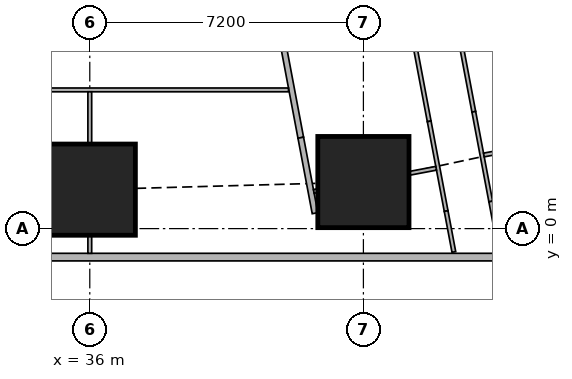
"""IFC4 building model, lengths in metres.
Left out: names, types, materials, properties, quantities, classifications, styles, units other than length and angle.
Written with IfcOpenShell. Run it as: python <this file> out.ifc"""

import sys

from ifc_helpers import new_model, si_unit, direction, frame, frame_2d, origin, origin_2d, place, context, subcontext, project, spatial, rectangle, extrude, element, fill, save


model = new_model("IFC4")
c1 = context("Model", 3, precision=1e-05, world=origin(), true_north=direction((0.0, 1.0)))
c2 = subcontext(c1, "Body", "Model", "MODEL_VIEW")
j1 = project(units=[si_unit("LENGTHUNIT", "METRE"), si_unit("PLANEANGLEUNIT", "RADIAN")], contexts=[c1])
p1 = place(None, origin())
s1 = spatial("IfcSite", under=j1, at=p1, CompositionType="ELEMENT")
p2 = place(p1, origin())
s2 = spatial("IfcBuilding", under=s1, at=p2, CompositionType="ELEMENT")
p3 = place(p2, frame((0.0, 0.0, 193.7)))
s3 = spatial("IfcBuildingStorey", under=s2, at=p3, CompositionType="ELEMENT", Elevation=193.7)
for number, where, z_axis, x_axis in (
    (1, (36.0, 1.025, 0.0), (0.0, 0.0, 1.0), (1.0, 0.0, 0.0)),
    (2, (43.2, 1.225, 0.0), (0.0, 0.0, 1.0), (1.0, 0.0, 0.0)),
):
    element("IfcColumn", number, at=place(p3, frame(where, z_axis=z_axis, x_axis=x_axis)), inside=s3, PredefinedType="COLUMN", context=c2, shape_type="SweptSolid", body=[
        extrude(rectangle(XDim=2.4, YDim=2.4, at=origin_2d()), origin(), (0.0, 0.0, 1.0), 3.75),
    ])
p4 = place(p3, frame((7.363, -0.75, 0.0), z_axis=(0.0, 0.0, 1.0), x_axis=(1.0, 0.0, 0.0)))
e3 = element("IfcWall", 3, at=p4, inside=s3, PredefinedType="SOLIDWALL", context=c2, shape_type="SweptSolid", body=[
    extrude(rectangle(XDim=40.428, YDim=0.2, at=frame_2d((20.214, 0.0))), origin(), (0.0, 0.0, 1.0), 3.5),
])
p5 = place(p4, frame((2.319, 0.0, 0.9)))
e4 = element("IfcOpeningElement", 4, at=p5, cuts=e3, PredefinedType="OPENING", context=c2, shape_type="SweptSolid", body=[
    extrude(rectangle(XDim=2.4, YDim=1.5, at=frame_2d((1.2, 0.75))), frame((0.0, 0.11, 0.0), z_axis=(0.0, -1.0, 0.0), x_axis=(1.0, 0.0, 0.0)), (0.0, 0.0, 1.0), 0.22),
])
p6 = place(p4, frame((7.937, 0.0, 0.9)))
e5 = element("IfcOpeningElement", 5, at=p6, cuts=e3, PredefinedType="OPENING", context=c2, shape_type="SweptSolid", body=[
    extrude(rectangle(XDim=1.8, YDim=1.5, at=frame_2d((0.9, 0.75))), frame((0.0, 0.11, 0.0), z_axis=(0.0, -1.0, 0.0), x_axis=(1.0, 0.0, 0.0)), (0.0, 0.0, 1.0), 0.22),
])
p7 = place(p4, frame((11.537, 0.0, 0.9)))
e6 = element("IfcOpeningElement", 6, at=p7, cuts=e3, PredefinedType="OPENING", context=c2, shape_type="SweptSolid", body=[
    extrude(rectangle(XDim=1.8, YDim=1.5, at=frame_2d((0.9, 0.75))), frame((0.0, 0.11, 0.0), z_axis=(0.0, -1.0, 0.0), x_axis=(1.0, 0.0, 0.0)), (0.0, 0.0, 1.0), 0.22),
])
p8 = place(p4, frame((15.137, 0.0, 0.9)))
e7 = element("IfcOpeningElement", 7, at=p8, cuts=e3, PredefinedType="OPENING", context=c2, shape_type="SweptSolid", body=[
    extrude(rectangle(XDim=1.8, YDim=1.5, at=frame_2d((0.9, 0.75))), frame((0.0, 0.11, 0.0), z_axis=(0.0, -1.0, 0.0), x_axis=(1.0, 0.0, 0.0)), (0.0, 0.0, 1.0), 0.22),
])
p9 = place(p4, frame((18.737, 0.0, 0.9)))
e8 = element("IfcOpeningElement", 8, at=p9, cuts=e3, PredefinedType="OPENING", context=c2, shape_type="SweptSolid", body=[
    extrude(rectangle(XDim=1.8, YDim=1.5, at=frame_2d((0.9, 0.75))), frame((0.0, 0.11, 0.0), z_axis=(0.0, -1.0, 0.0), x_axis=(1.0, 0.0, 0.0)), (0.0, 0.0, 1.0), 0.22),
])
p10 = place(p4, frame((22.337, 0.0, 0.9)))
e9 = element("IfcOpeningElement", 9, at=p10, cuts=e3, PredefinedType="OPENING", context=c2, shape_type="SweptSolid", body=[
    extrude(rectangle(XDim=1.8, YDim=1.5, at=frame_2d((0.9, 0.75))), frame((0.0, 0.11, 0.0), z_axis=(0.0, -1.0, 0.0), x_axis=(1.0, 0.0, 0.0)), (0.0, 0.0, 1.0), 0.22),
])
p11 = place(p4, frame((25.937, 0.0, 0.9)))
e10 = element("IfcOpeningElement", 10, at=p11, cuts=e3, PredefinedType="OPENING", context=c2, shape_type="SweptSolid", body=[
    extrude(rectangle(XDim=1.8, YDim=1.5, at=frame_2d((0.9, 0.75))), frame((0.0, 0.11, 0.0), z_axis=(0.0, -1.0, 0.0), x_axis=(1.0, 0.0, 0.0)), (0.0, 0.0, 1.0), 0.22),
])
p12 = place(p4, frame((29.537, 0.0, 0.9)))
e11 = element("IfcOpeningElement", 11, at=p12, cuts=e3, PredefinedType="OPENING", context=c2, shape_type="SweptSolid", body=[
    extrude(rectangle(XDim=1.8, YDim=1.5, at=frame_2d((0.9, 0.75))), frame((0.0, 0.11, 0.0), z_axis=(0.0, -1.0, 0.0), x_axis=(1.0, 0.0, 0.0)), (0.0, 0.0, 1.0), 0.22),
])
p13 = place(p4, frame((33.137, 0.0, 0.9)))
e12 = element("IfcOpeningElement", 12, at=p13, cuts=e3, PredefinedType="OPENING", context=c2, shape_type="SweptSolid", body=[
    extrude(rectangle(XDim=1.8, YDim=1.5, at=frame_2d((0.9, 0.75))), frame((0.0, 0.11, 0.0), z_axis=(0.0, -1.0, 0.0), x_axis=(1.0, 0.0, 0.0)), (0.0, 0.0, 1.0), 0.22),
])
p14 = place(p3, frame((50.653, 2.703, 0.0), z_axis=(0.0, 0.0, 1.0), x_axis=(-0.185612026696, 0.982623109613, 0.0)))
e13 = element("IfcWall", 13, at=p14, inside=s3, PredefinedType="SOLIDWALL", context=c2, shape_type="SweptSolid", body=[
    extrude(rectangle(XDim=41.393, YDim=0.2, at=frame_2d((20.697, 0.0))), origin(), (0.0, 0.0, 1.0), 3.5),
])
p15 = place(p14, frame((1.633, 0.0, 0.9)))
e14 = element("IfcOpeningElement", 14, at=p15, cuts=e13, PredefinedType="OPENING", context=c2, shape_type="SweptSolid", body=[
    extrude(rectangle(XDim=1.8, YDim=1.5, at=frame_2d((0.9, 0.75))), frame((0.0, 0.11, 0.0), z_axis=(0.0, -1.0, 0.0), x_axis=(1.0, 0.0, 0.0)), (0.0, 0.0, 1.0), 0.22),
])
p16 = place(p14, frame((6.032, 0.0, 0.9)))
e15 = element("IfcOpeningElement", 15, at=p16, cuts=e13, PredefinedType="OPENING", context=c2, shape_type="SweptSolid", body=[
    extrude(rectangle(XDim=1.8, YDim=1.5, at=frame_2d((0.9, 0.75))), frame((0.0, 0.11, 0.0), z_axis=(0.0, -1.0, 0.0), x_axis=(1.0, 0.0, 0.0)), (0.0, 0.0, 1.0), 0.22),
])
p17 = place(p14, frame((9.848, 0.0, 0.9)))
e16 = element("IfcOpeningElement", 16, at=p17, cuts=e13, PredefinedType="OPENING", context=c2, shape_type="SweptSolid", body=[
    extrude(rectangle(XDim=1.8, YDim=1.5, at=frame_2d((0.9, 0.75))), frame((0.0, 0.11, 0.0), z_axis=(0.0, -1.0, 0.0), x_axis=(1.0, 0.0, 0.0)), (0.0, 0.0, 1.0), 0.22),
])
p18 = place(p14, frame((13.664, 0.0, 0.9)))
e17 = element("IfcOpeningElement", 17, at=p18, cuts=e13, PredefinedType="OPENING", context=c2, shape_type="SweptSolid", body=[
    extrude(rectangle(XDim=1.8, YDim=1.5, at=frame_2d((0.9, 0.75))), frame((0.0, 0.11, 0.0), z_axis=(0.0, -1.0, 0.0), x_axis=(1.0, 0.0, 0.0)), (0.0, 0.0, 1.0), 0.22),
])
p19 = place(p14, frame((17.481, 0.0, 0.9)))
e18 = element("IfcOpeningElement", 18, at=p19, cuts=e13, PredefinedType="OPENING", context=c2, shape_type="SweptSolid", body=[
    extrude(rectangle(XDim=1.8, YDim=1.5, at=frame_2d((0.9, 0.75))), frame((0.0, 0.11, 0.0), z_axis=(0.0, -1.0, 0.0), x_axis=(1.0, 0.0, 0.0)), (0.0, 0.0, 1.0), 0.22),
])
p20 = place(p14, frame((21.297, 0.0, 0.9)))
e19 = element("IfcOpeningElement", 19, at=p20, cuts=e13, PredefinedType="OPENING", context=c2, shape_type="SweptSolid", body=[
    extrude(rectangle(XDim=1.8, YDim=1.5, at=frame_2d((0.9, 0.75))), frame((0.0, 0.11, 0.0), z_axis=(0.0, -1.0, 0.0), x_axis=(1.0, 0.0, 0.0)), (0.0, 0.0, 1.0), 0.22),
])
p21 = place(p14, frame((25.113, 0.0, 0.9)))
e20 = element("IfcOpeningElement", 20, at=p21, cuts=e13, PredefinedType="OPENING", context=c2, shape_type="SweptSolid", body=[
    extrude(rectangle(XDim=1.8, YDim=1.5, at=frame_2d((0.9, 0.75))), frame((0.0, 0.11, 0.0), z_axis=(0.0, -1.0, 0.0), x_axis=(1.0, 0.0, 0.0)), (0.0, 0.0, 1.0), 0.22),
])
p22 = place(p14, frame((28.93, 0.0, 0.9)))
e21 = element("IfcOpeningElement", 21, at=p22, cuts=e13, PredefinedType="OPENING", context=c2, shape_type="SweptSolid", body=[
    extrude(rectangle(XDim=1.8, YDim=1.5, at=frame_2d((0.9, 0.75))), frame((0.0, 0.11, 0.0), z_axis=(0.0, -1.0, 0.0), x_axis=(1.0, 0.0, 0.0)), (0.0, 0.0, 1.0), 0.22),
])
p23 = place(p14, frame((32.746, 0.0, 0.9)))
e22 = element("IfcOpeningElement", 22, at=p23, cuts=e13, PredefinedType="OPENING", context=c2, shape_type="SweptSolid", body=[
    extrude(rectangle(XDim=1.8, YDim=1.5, at=frame_2d((0.9, 0.75))), frame((0.0, 0.11, 0.0), z_axis=(0.0, -1.0, 0.0), x_axis=(1.0, 0.0, 0.0)), (0.0, 0.0, 1.0), 0.22),
])
p24 = place(p14, frame((36.481, 0.0, 0.9)))
e23 = element("IfcOpeningElement", 23, at=p24, cuts=e13, PredefinedType="OPENING", context=c2, shape_type="SweptSolid", body=[
    extrude(rectangle(XDim=1.8, YDim=1.5, at=frame_2d((0.9, 0.75))), frame((0.0, 0.11, 0.0), z_axis=(0.0, -1.0, 0.0), x_axis=(1.0, 0.0, 0.0)), (0.0, 0.0, 1.0), 0.22),
])
p25 = place(p3, frame((33.933, 42.73, 0.0), z_axis=(0.0, 0.0, 1.0), x_axis=(0.185595417643, -0.982626246825, 0.0)))
e24 = element("IfcWall", 24, at=p25, inside=s3, PredefinedType="SOLIDWALL", context=c2, shape_type="SweptSolid", body=[
    extrude(rectangle(XDim=41.051, YDim=0.15, at=frame_2d((20.525, 0.0))), origin(), (0.0, 0.0, 1.0), 2.5),
])
p26 = place(p25, frame((16.082, 0.0, 0.0)))
e25 = element("IfcOpeningElement", 25, at=p26, cuts=e24, PredefinedType="OPENING", context=c2, shape_type="SweptSolid", body=[
    extrude(rectangle(XDim=1.0, YDim=2.1, at=frame_2d((0.5, 1.05))), frame((0.0, 0.085, 0.0), z_axis=(0.0, -1.0, 0.0), x_axis=(1.0, 0.0, 0.0)), (0.0, 0.0, 1.0), 0.17),
])
p27 = place(p25, frame((19.898, 0.0, 0.0)))
e26 = element("IfcOpeningElement", 26, at=p27, cuts=e24, PredefinedType="OPENING", context=c2, shape_type="SweptSolid", body=[
    extrude(rectangle(XDim=1.0, YDim=2.1, at=frame_2d((0.5, 1.05))), frame((0.0, 0.085, 0.0), z_axis=(0.0, -1.0, 0.0), x_axis=(1.0, 0.0, 0.0)), (0.0, 0.0, 1.0), 0.17),
])
p28 = place(p25, frame((30.862, 0.0, 0.0)))
e27 = element("IfcOpeningElement", 27, at=p28, cuts=e24, PredefinedType="OPENING", context=c2, shape_type="SweptSolid", body=[
    extrude(rectangle(XDim=1.0, YDim=2.1, at=frame_2d((0.5, 1.05))), frame((0.0, 0.085, 0.0), z_axis=(0.0, -1.0, 0.0), x_axis=(1.0, 0.0, 0.0)), (0.0, 0.0, 1.0), 0.17),
])
p29 = place(p3, frame((41.552, 2.392, 0.0), z_axis=(0.0, 0.0, 1.0), x_axis=(0.185535500323, -0.982637561932, 0.0)))
e28 = element("IfcWall", 28, at=p29, inside=s3, PredefinedType="SOLIDWALL", context=c2, shape_type="SweptSolid", body=[
    extrude(rectangle(XDim=2.021, YDim=0.15, at=frame_2d((1.011, 0.0))), origin(), (0.0, 0.0, 1.0), 2.05),
])
p30 = place(p3, frame((41.229, 3.65, 0.0), z_axis=(0.0, 0.0, 1.0), x_axis=(-1.0, 0.0, 0.0)))
e29 = element("IfcWall", 29, at=p30, inside=s3, PredefinedType="PARTITIONING", context=c2, shape_type="SweptSolid", body=[
    extrude(rectangle(XDim=8.829, YDim=0.1, at=frame_2d((4.415, 0.0))), origin(), (0.0, 0.0, 1.0), 3.5),
])
p31 = place(p30, frame((7.729, 0.0, 0.0)))
e30 = element("IfcOpeningElement", 30, at=p31, cuts=e29, PredefinedType="OPENING", context=c2, shape_type="SweptSolid", body=[
    extrude(rectangle(XDim=0.9, YDim=2.1, at=frame_2d((0.45, 1.05))), frame((0.0, 0.06, 0.0), z_axis=(0.0, -1.0, 0.0), x_axis=(1.0, 0.0, 0.0)), (0.0, 0.0, 1.0), 0.12),
])
p32 = place(p30, frame((4.129, 0.0, 0.0)))
e31 = element("IfcOpeningElement", 31, at=p32, cuts=e29, PredefinedType="OPENING", context=c2, shape_type="SweptSolid", body=[
    extrude(rectangle(XDim=0.9, YDim=2.1, at=frame_2d((0.45, 1.05))), frame((0.0, 0.06, 0.0), z_axis=(0.0, -1.0, 0.0), x_axis=(1.0, 0.0, 0.0)), (0.0, 0.0, 1.0), 0.12),
])
p33 = place(p3, frame((36.0, -0.65, 0.0), z_axis=(0.0, 0.0, 1.0), x_axis=(0.0, 1.0, 0.0)))
e32 = element("IfcWall", 32, at=p33, inside=s3, PredefinedType="PARTITIONING", context=c2, shape_type="SweptSolid", body=[
    extrude(rectangle(XDim=0.474, YDim=0.1, at=frame_2d((0.237, 0.0))), origin(), (0.0, 0.0, 1.0), 3.5),
])
p34 = place(p3, frame((36.0, 2.226, 0.0), z_axis=(0.0, 0.0, 1.0), x_axis=(0.0, 1.0, 0.0)))
e33 = element("IfcWall", 33, at=p34, inside=s3, PredefinedType="PARTITIONING", context=c2, shape_type="SweptSolid", body=[
    extrude(rectangle(XDim=1.374, YDim=0.1, at=frame_2d((0.687, 0.0))), origin(), (0.0, 0.0, 1.0), 3.5),
])
p35 = place(p3, frame((44.727, 10.366, 0.0), z_axis=(0.0, 0.0, 1.0), x_axis=(0.185678775129, -0.982610498858, 0.0)))
e34 = element("IfcWall", 34, at=p35, inside=s3, PredefinedType="PARTITIONING", context=c2, shape_type="SweptSolid", body=[
    extrude(rectangle(XDim=7.421, YDim=0.1, at=frame_2d((3.71, 0.0))), origin(), (0.0, 0.0, 1.0), 3.5),
])
p36 = place(p35, frame((0.151, 0.0, 0.0)))
e35 = element("IfcOpeningElement", 35, at=p36, cuts=e34, PredefinedType="OPENING", context=c2, shape_type="SweptSolid", body=[
    extrude(rectangle(XDim=0.9, YDim=2.1, at=frame_2d((0.45, 1.05))), frame((0.0, 0.06, 0.0), z_axis=(0.0, -1.0, 0.0), x_axis=(1.0, 0.0, 0.0)), (0.0, 0.0, 1.0), 0.12),
])
p37 = place(p35, frame((4.65, 0.0, 0.0)))
e36 = element("IfcOpeningElement", 36, at=p37, cuts=e34, PredefinedType="OPENING", context=c2, shape_type="SweptSolid", body=[
    extrude(rectangle(XDim=0.9, YDim=2.1, at=frame_2d((0.45, 1.05))), frame((0.0, 0.06, 0.0), z_axis=(0.0, -1.0, 0.0), x_axis=(1.0, 0.0, 0.0)), (0.0, 0.0, 1.0), 0.12),
])
p38 = place(p3, frame((46.105, 3.074, 0.0), z_axis=(0.0, 0.0, 1.0), x_axis=(0.185631845838, -0.982619365681, 0.0)))
e37 = element("IfcWall", 37, at=p38, inside=s3, PredefinedType="PARTITIONING", context=c2, shape_type="SweptSolid", body=[
    extrude(rectangle(XDim=2.403, YDim=0.1, at=frame_2d((1.201, 0.0))), origin(), (0.0, 0.0, 1.0), 2.05),
])
p39 = place(p3, frame((46.551, 0.713, 0.0), z_axis=(0.0, 0.0, 1.0), x_axis=(0.185407859198, -0.982661653748, 0.0)))
e38 = element("IfcWall", 38, at=p39, inside=s3, PredefinedType="PARTITIONING", context=c2, shape_type="SweptSolid", body=[
    extrude(rectangle(XDim=1.343, YDim=0.1, at=frame_2d((0.671, 0.0))), origin(), (0.0, 0.0, 1.0), 3.5),
])
p40 = place(p3, frame((43.949, 8.02, 0.0), z_axis=(0.0, 0.0, 1.0), x_axis=(0.185656792073, -0.982614652627, 0.0)))
e39 = element("IfcWall", 39, at=p40, inside=s3, PredefinedType="PARTITIONING", context=c2, shape_type="SweptSolid", body=[
    extrude(rectangle(XDim=5.289, YDim=0.1, at=frame_2d((2.645, 0.0))), origin(), (0.0, 0.0, 1.0), 3.5),
])
p41 = place(p40, frame((1.2, 0.0, 0.0)))
e40 = element("IfcOpeningElement", 40, at=p41, cuts=e39, PredefinedType="OPENING", context=c2, shape_type="SweptSolid", body=[
    extrude(rectangle(XDim=0.9, YDim=2.1, at=frame_2d((0.45, 1.05))), frame((0.0, 0.06, 0.0), z_axis=(0.0, -1.0, 0.0), x_axis=(1.0, 0.0, 0.0)), (0.0, 0.0, 1.0), 0.12),
])
p42 = place(p40, frame((2.935, 0.0, 0.0)))
e41 = element("IfcOpeningElement", 41, at=p42, cuts=e39, PredefinedType="OPENING", context=c2, shape_type="SweptSolid", body=[
    extrude(rectangle(XDim=0.9, YDim=2.1, at=frame_2d((0.45, 1.05))), frame((0.0, 0.06, 0.0), z_axis=(0.0, -1.0, 0.0), x_axis=(1.0, 0.0, 0.0)), (0.0, 0.0, 1.0), 0.12),
])
p43 = place(p3, frame((44.931, 2.823, 0.0), z_axis=(0.0, 0.0, 1.0), x_axis=(0.185631845838, -0.982619365681, 0.0)))
e42 = element("IfcWall", 42, at=p43, inside=s3, PredefinedType="PARTITIONING", context=c2, shape_type="SweptSolid", body=[
    extrude(rectangle(XDim=2.403, YDim=0.1, at=frame_2d((1.201, 0.0))), origin(), (0.0, 0.0, 1.0), 2.05),
])
p44 = place(p3, frame((45.377, 0.462, 0.0), z_axis=(0.0, 0.0, 1.0), x_axis=(0.185513480919, -0.982641719243, 0.0)))
e43 = element("IfcWall", 43, at=p44, inside=s3, PredefinedType="PARTITIONING", context=c2, shape_type="SweptSolid", body=[
    extrude(rectangle(XDim=1.095, YDim=0.1, at=frame_2d((0.547, 0.0))), origin(), (0.0, 0.0, 1.0), 3.5),
])
p45 = place(p3, frame((46.738, 2.006, 0.0), z_axis=(0.0, 0.0, 1.0), x_axis=(-0.982820466874, -0.184564161994, 0.0)))
e44 = element("IfcWall", 44, at=p45, inside=s3, PredefinedType="PARTITIONING", context=c2, shape_type="SweptSolid", body=[
    extrude(rectangle(XDim=0.374, YDim=0.1, at=frame_2d((0.187, 0.0))), origin(), (0.0, 0.0, 1.0), 2.05),
])
p46 = place(p3, frame((45.114, 1.587, 0.0), z_axis=(0.0, 0.0, 1.0), x_axis=(-0.982671022916, -0.185358195723, 0.0)))
e45 = element("IfcWall", 45, at=p46, inside=s3, PredefinedType="PARTITIONING", context=c2, shape_type="SweptSolid", body=[
    extrude(rectangle(XDim=0.717, YDim=0.1, at=frame_2d((0.358, 0.0))), origin(), (0.0, 0.0, 1.0), 2.05),
])
p47 = place(p3, frame((41.99, 0.997, 0.0), z_axis=(0.0, 0.0, 1.0), x_axis=(-0.982382747416, -0.186880008506, 0.0)))
e46 = element("IfcWall", 46, at=p47, inside=s3, PredefinedType="PARTITIONING", context=c2, shape_type="SweptSolid", body=[
    extrude(rectangle(XDim=0.097, YDim=0.1, at=frame_2d((0.048, 0.0))), origin(), (0.0, 0.0, 1.0), 2.05),
])
p48 = place(p11, origin())
e47 = element("IfcWindow", 47, at=p48, inside=s3, PartitioningType="SINGLE_PANEL", PredefinedType="WINDOW", context=c2, shape_type="SweptSolid", body=[
    extrude(rectangle(XDim=1.8, YDim=1.5, at=frame_2d((0.9, 0.75))), frame((0.0, 0.03, 0.0), z_axis=(0.0, -1.0, 0.0), x_axis=(1.0, 0.0, 0.0)), (0.0, 0.0, 1.0), 0.06),
])
fill(e10, e47)
p49 = place(p12, origin())
e48 = element("IfcWindow", 48, at=p49, inside=s3, PartitioningType="SINGLE_PANEL", PredefinedType="WINDOW", context=c2, shape_type="SweptSolid", body=[
    extrude(rectangle(XDim=1.8, YDim=1.5, at=frame_2d((0.9, 0.75))), frame((0.0, 0.03, 0.0), z_axis=(0.0, -1.0, 0.0), x_axis=(1.0, 0.0, 0.0)), (0.0, 0.0, 1.0), 0.06),
])
fill(e11, e48)
p50 = place(p13, origin())
e49 = element("IfcWindow", 49, at=p50, inside=s3, PartitioningType="SINGLE_PANEL", PredefinedType="WINDOW", context=c2, shape_type="SweptSolid", body=[
    extrude(rectangle(XDim=1.8, YDim=1.5, at=frame_2d((0.9, 0.75))), frame((0.0, 0.03, 0.0), z_axis=(0.0, -1.0, 0.0), x_axis=(1.0, 0.0, 0.0)), (0.0, 0.0, 1.0), 0.06),
])
fill(e12, e49)
p51 = place(p32, origin())
e50 = element("IfcDoor", 50, at=p51, inside=s3, OperationType="SINGLE_SWING_RIGHT", PredefinedType="DOOR", context=c2, shape_type="SweptSolid", body=[
    extrude(rectangle(XDim=0.9, YDim=2.1, at=frame_2d((0.45, 1.05))), frame((0.0, 0.025, 0.0), z_axis=(0.0, -1.0, 0.0), x_axis=(1.0, 0.0, 0.0)), (0.0, 0.0, 1.0), 0.05),
])
fill(e31, e50)
p52 = place(p42, origin())
e51 = element("IfcDoor", 51, at=p52, inside=s3, OperationType="SINGLE_SWING_RIGHT", PredefinedType="DOOR", context=c2, shape_type="SweptSolid", body=[
    extrude(rectangle(XDim=0.9, YDim=2.1, at=frame_2d((0.45, 1.05))), frame((0.0, 0.025, 0.0), z_axis=(0.0, -1.0, 0.0), x_axis=(1.0, 0.0, 0.0)), (0.0, 0.0, 1.0), 0.05),
])
fill(e41, e51)
save(model, sys.argv[1])
